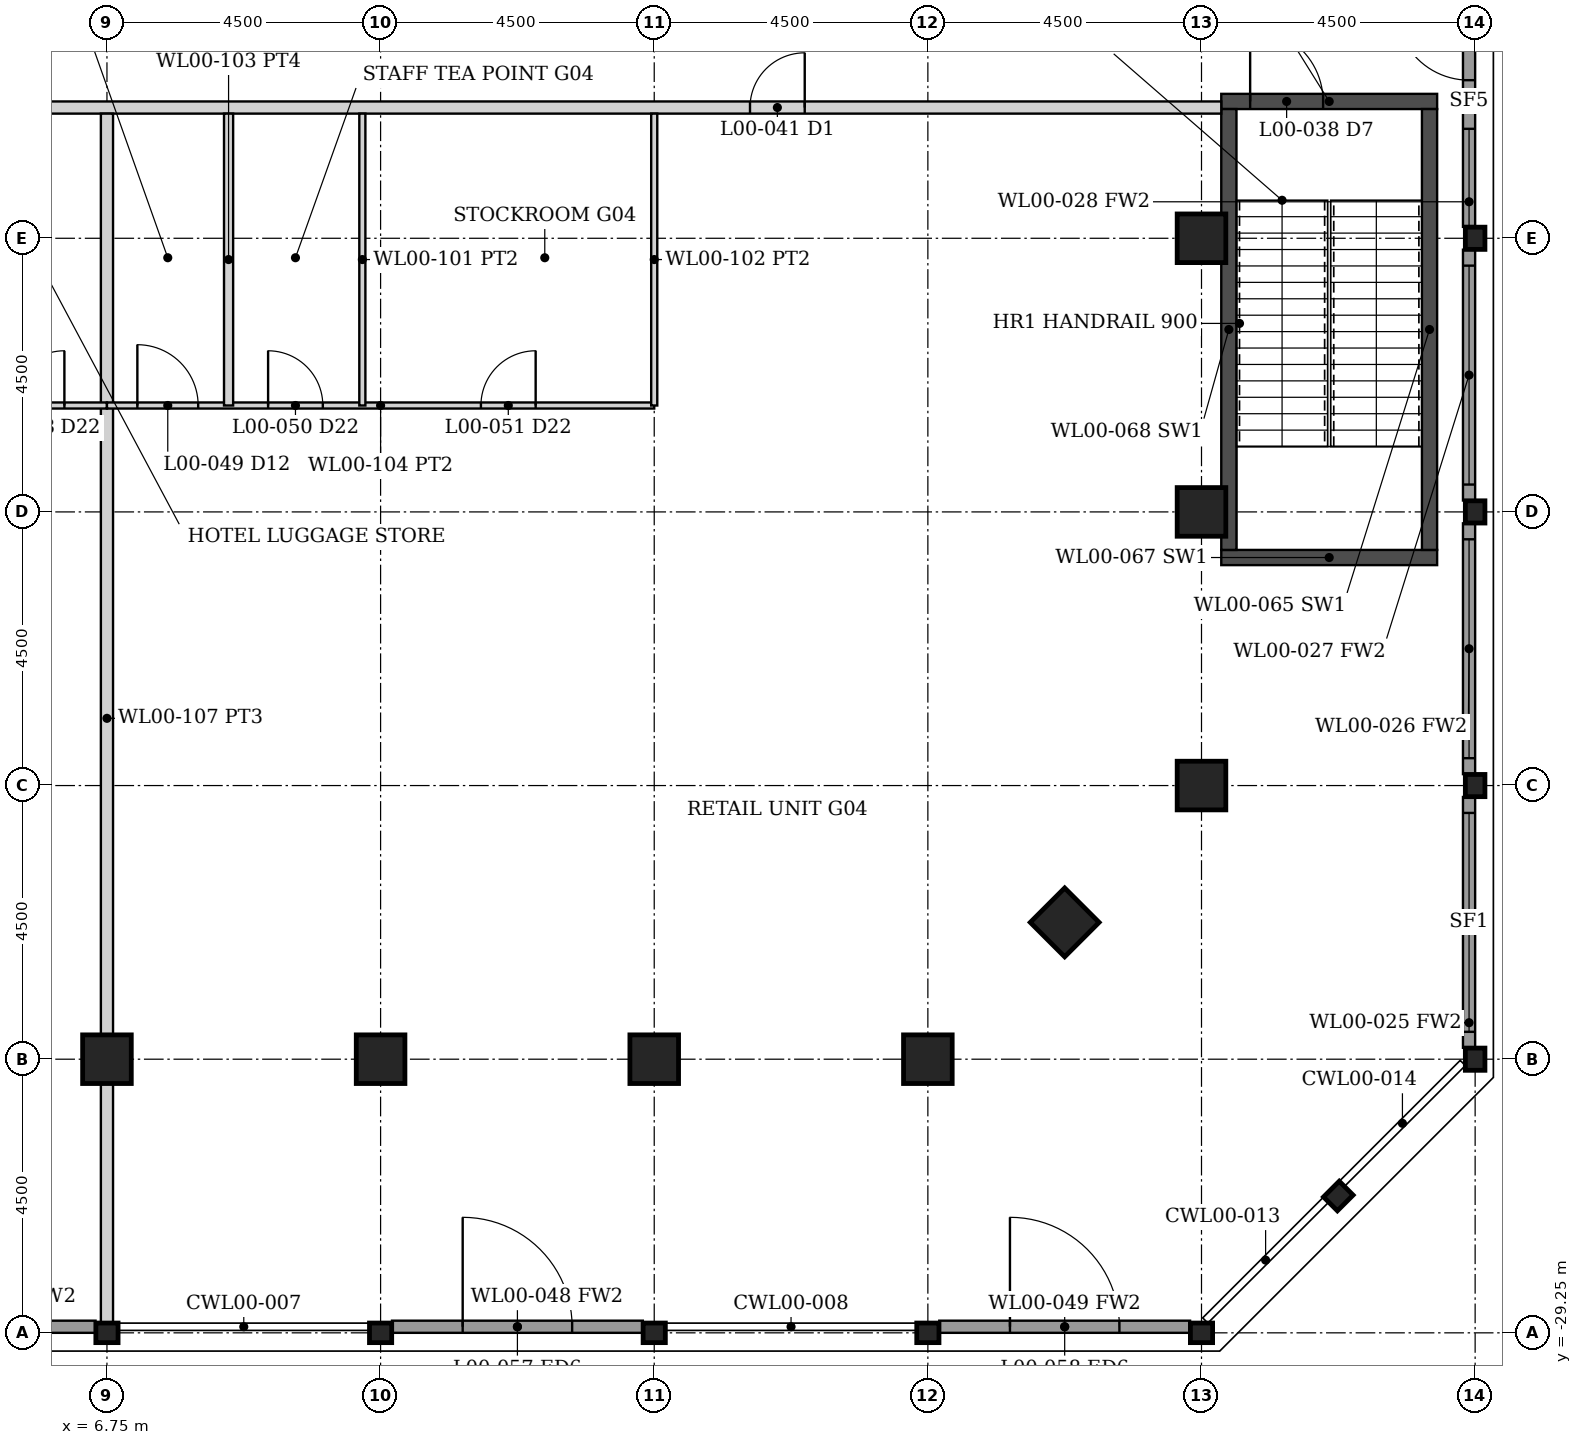
"""IFC4 building model, lengths in metres.
Left out: names, types, materials, properties, quantities, classifications, styles, units other than length and angle.
Written with IfcOpenShell. Run it as: python <this file> out.ifc"""

import sys

from ifc_helpers import new_model, si_unit, direction, frame, frame_2d, origin, origin_2d, place, context, subcontext, project, spatial, rectangle, hollow_rectangle, i_section, extrude, element, fill, save


model = new_model("IFC4")
c1 = context("Model", 3, precision=1e-05, world=origin(), true_north=direction((0.0, 1.0)))
c2 = subcontext(c1, "Body", "Model", "MODEL_VIEW")
j1 = project(units=[si_unit("LENGTHUNIT", "METRE"), si_unit("PLANEANGLEUNIT", "RADIAN")], contexts=[c1])
p1 = place(None, origin())
s1 = spatial("IfcSite", under=j1, at=p1, CompositionType="ELEMENT")
p2 = place(p1, origin())
s2 = spatial("IfcBuilding", under=s1, at=p2, CompositionType="ELEMENT")
p3 = place(p2, origin())
s3 = spatial("IfcBuildingStorey", under=s2, at=p3, CompositionType="ELEMENT", Elevation=0.0)
for number, where, z_axis, x_axis in (
    (1, (24.75, -20.25, -0.3), (0.0, 0.0, 1.0), (1.0, 0.0, 0.0)),
    (2, (24.75, -15.75, -0.3), (0.0, 0.0, 1.0), (1.0, 0.0, 0.0)),
    (3, (24.75, -11.25, -0.3), (0.0, 0.0, 1.0), (1.0, 0.0, 0.0)),
    (4, (6.75, -24.75, -0.3), (0.0, 0.0, 1.0), (0.0, 1.0, 0.0)),
    (5, (11.25, -24.75, -0.3), (0.0, 0.0, 1.0), (0.0, 1.0, 0.0)),
    (6, (15.75, -24.75, -0.3), (0.0, 0.0, 1.0), (0.0, 1.0, 0.0)),
    (7, (20.25, -24.75, -0.3), (0.0, 0.0, 1.0), (0.0, 1.0, 0.0)),
    (8, (22.5, -22.5, -0.3), (0.0, 0.0, 1.0), (0.707, -0.707, 0.0)),
):
    element("IfcColumn", number, at=place(p3, frame(where, z_axis=z_axis, x_axis=x_axis)), inside=s3, PredefinedType="COLUMN", context=c2, shape_type="SweptSolid", body=[
        extrude(hollow_rectangle(XDim=0.8, YDim=0.8, WallThickness=0.08, at=origin_2d()), origin(), (0.0, 0.0, 1.0), 6.3),
    ])
for number, where, z_axis, x_axis in (
    (9, (29.25, -24.75, -0.3), (0.0, 0.0, 1.0), (1.0, 0.0, 0.0)),
    (10, (29.25, -20.25, -0.3), (0.0, 0.0, 1.0), (1.0, 0.0, 0.0)),
    (11, (29.25, -15.75, -0.3), (0.0, 0.0, 1.0), (1.0, 0.0, 0.0)),
    (12, (29.25, -11.25, -0.3), (0.0, 0.0, 1.0), (1.0, 0.0, 0.0)),
    (13, (6.75, -29.25, -0.3), (0.0, 0.0, 1.0), (0.0, 1.0, 0.0)),
    (14, (11.25, -29.25, -0.3), (0.0, 0.0, 1.0), (0.0, 1.0, 0.0)),
    (15, (15.75, -29.25, -0.3), (0.0, 0.0, 1.0), (0.0, 1.0, 0.0)),
    (16, (20.25, -29.25, -0.3), (0.0, 0.0, 1.0), (0.0, 1.0, 0.0)),
    (17, (24.75, -29.25, -0.3), (0.0, 0.0, 1.0), (0.0, 1.0, 0.0)),
    (18, (27.0, -27.0, -0.3), (0.0, 0.0, 1.0), (0.707, -0.707, 0.0)),
):
    element("IfcColumn", number, at=place(p3, frame(where, z_axis=z_axis, x_axis=x_axis)), inside=s3, PredefinedType="COLUMN", context=c2, shape_type="SweptSolid", body=[
        extrude(i_section(OverallWidth=0.322, OverallDepth=0.365, WebThickness=0.027, FlangeThickness=0.044, FilletRadius=0.015, at=origin_2d()), origin(), (0.0, 0.0, 1.0), 6.3),
    ])
p4 = place(p3, frame((25.075, -16.5, 0.0), z_axis=(0.0, 0.0, 1.0), x_axis=(1.0, 0.0, 0.0)))
e19 = element("IfcWall", 19, at=p4, inside=s3, PredefinedType="SHEAR", context=c2, shape_type="SweptSolid", body=[
    extrude(rectangle(XDim=3.55, YDim=0.25, at=frame_2d((1.775, 0.0))), origin(), (0.0, 0.0, 1.0), 6.0),
])
p5 = place(p3, frame((25.075, -9.0, 0.0), z_axis=(0.0, 0.0, 1.0), x_axis=(1.0, 0.0, 0.0)))
e20 = element("IfcWall", 20, at=p5, inside=s3, PredefinedType="SHEAR", context=c2, shape_type="SweptSolid", body=[
    extrude(rectangle(XDim=3.55, YDim=0.25, at=frame_2d((1.775, 0.0))), origin(), (0.0, 0.0, 1.0), 6.0),
])
p6 = place(p5, frame((0.475, 0.0, 0.0)))
e21 = element("IfcOpeningElement", 21, at=p6, cuts=e20, PredefinedType="OPENING", context=c2, shape_type="SweptSolid", body=[
    extrude(rectangle(XDim=1.2, YDim=2.1, at=frame_2d((0.6, 1.05))), frame((0.0, 0.135, 0.0), z_axis=(0.0, -1.0, 0.0), x_axis=(1.0, 0.0, 0.0)), (0.0, 0.0, 1.0), 0.27),
])
for number, where, z_axis, x_axis in (
    (22, (25.2, -16.375, 0.0), (0.0, 0.0, 1.0), (0.0, 1.0, 0.0)),
    (23, (28.5, -16.375, 0.0), (0.0, 0.0, 1.0), (0.0, 1.0, 0.0)),
):
    element("IfcWall", number, at=place(p3, frame(where, z_axis=z_axis, x_axis=x_axis)), inside=s3, PredefinedType="SHEAR", context=c2, shape_type="SweptSolid", body=[
        extrude(rectangle(XDim=7.25, YDim=0.25, at=frame_2d((3.625, 0.0))), origin(), (0.0, 0.0, 1.0), 6.0),
    ])
p7 = place(p3, frame((2.438, -29.15, 0.0), z_axis=(0.0, 0.0, 1.0), x_axis=(1.0, 0.0, 0.0)))
e24 = element("IfcWall", 24, at=p7, inside=s3, PredefinedType="SOLIDWALL", context=c2, shape_type="SweptSolid", body=[
    extrude(rectangle(XDim=4.125, YDim=0.2, at=frame_2d((2.062, 0.0))), origin(), (0.0, 0.0, 1.0), 5.133),
])
p8 = place(p7, frame((1.162, 0.0, 0.0)))
e25 = element("IfcOpeningElement", 25, at=p8, cuts=e24, PredefinedType="OPENING", context=c2, shape_type="SweptSolid", body=[
    extrude(rectangle(XDim=1.8, YDim=2.7, at=frame_2d((0.9, 1.35))), frame((0.0, 0.11, 0.0), z_axis=(0.0, -1.0, 0.0), x_axis=(1.0, 0.0, 0.0)), (0.0, 0.0, 1.0), 0.22),
])
p9 = place(p3, frame((11.438, -29.15, 0.0), z_axis=(0.0, 0.0, 1.0), x_axis=(1.0, 0.0, 0.0)))
e26 = element("IfcWall", 26, at=p9, inside=s3, PredefinedType="SOLIDWALL", context=c2, shape_type="SweptSolid", body=[
    extrude(rectangle(XDim=4.125, YDim=0.2, at=frame_2d((2.062, 0.0))), origin(), (0.0, 0.0, 1.0), 5.133),
])
p10 = place(p9, frame((1.162, 0.0, 0.0)))
e27 = element("IfcOpeningElement", 27, at=p10, cuts=e26, PredefinedType="OPENING", context=c2, shape_type="SweptSolid", body=[
    extrude(rectangle(XDim=1.8, YDim=2.7, at=frame_2d((0.9, 1.35))), frame((0.0, 0.11, 0.0), z_axis=(0.0, -1.0, 0.0), x_axis=(1.0, 0.0, 0.0)), (0.0, 0.0, 1.0), 0.22),
])
p11 = place(p3, frame((20.438, -29.15, 0.0), z_axis=(0.0, 0.0, 1.0), x_axis=(1.0, 0.0, 0.0)))
e28 = element("IfcWall", 28, at=p11, inside=s3, PredefinedType="SOLIDWALL", context=c2, shape_type="SweptSolid", body=[
    extrude(rectangle(XDim=4.125, YDim=0.2, at=frame_2d((2.062, 0.0))), origin(), (0.0, 0.0, 1.0), 5.133),
])
p12 = place(p11, frame((1.162, 0.0, 0.0)))
e29 = element("IfcOpeningElement", 29, at=p12, cuts=e28, PredefinedType="OPENING", context=c2, shape_type="SweptSolid", body=[
    extrude(rectangle(XDim=1.8, YDim=2.7, at=frame_2d((0.9, 1.35))), frame((0.0, 0.11, 0.0), z_axis=(0.0, -1.0, 0.0), x_axis=(1.0, 0.0, 0.0)), (0.0, 0.0, 1.0), 0.22),
])
p13 = place(p3, frame((29.15, -24.562, 0.0), z_axis=(0.0, 0.0, 1.0), x_axis=(0.0, 1.0, 0.0)))
e30 = element("IfcWall", 30, at=p13, inside=s3, PredefinedType="SOLIDWALL", context=c2, shape_type="SweptSolid", body=[
    extrude(rectangle(XDim=4.125, YDim=0.2, at=frame_2d((2.062, 0.0))), origin(), (0.0, 0.0, 1.0), 5.133),
])
p14 = place(p13, frame((0.262, 0.0, 0.15)))
e31 = element("IfcOpeningElement", 31, at=p14, cuts=e30, PredefinedType="OPENING", context=c2, shape_type="SweptSolid", body=[
    extrude(rectangle(XDim=3.6, YDim=4.833, at=frame_2d((1.8, 2.417))), frame((0.0, 0.11, 0.0), z_axis=(0.0, -1.0, 0.0), x_axis=(1.0, 0.0, 0.0)), (0.0, 0.0, 1.0), 0.22),
])
p15 = place(p3, frame((29.15, -20.062, 0.0), z_axis=(0.0, 0.0, 1.0), x_axis=(0.0, 1.0, 0.0)))
e32 = element("IfcWall", 32, at=p15, inside=s3, PredefinedType="SOLIDWALL", context=c2, shape_type="SweptSolid", body=[
    extrude(rectangle(XDim=4.125, YDim=0.2, at=frame_2d((2.062, 0.0))), origin(), (0.0, 0.0, 1.0), 5.133),
])
p16 = place(p15, frame((0.262, 0.0, 0.15)))
e33 = element("IfcOpeningElement", 33, at=p16, cuts=e32, PredefinedType="OPENING", context=c2, shape_type="SweptSolid", body=[
    extrude(rectangle(XDim=3.6, YDim=4.833, at=frame_2d((1.8, 2.417))), frame((0.0, 0.11, 0.0), z_axis=(0.0, -1.0, 0.0), x_axis=(1.0, 0.0, 0.0)), (0.0, 0.0, 1.0), 0.22),
])
p17 = place(p3, frame((29.15, -15.562, 0.0), z_axis=(0.0, 0.0, 1.0), x_axis=(0.0, 1.0, 0.0)))
e34 = element("IfcWall", 34, at=p17, inside=s3, PredefinedType="SOLIDWALL", context=c2, shape_type="SweptSolid", body=[
    extrude(rectangle(XDim=4.125, YDim=0.2, at=frame_2d((2.062, 0.0))), origin(), (0.0, 0.0, 1.0), 5.133),
])
p18 = place(p17, frame((0.262, 0.0, 0.15)))
e35 = element("IfcOpeningElement", 35, at=p18, cuts=e34, PredefinedType="OPENING", context=c2, shape_type="SweptSolid", body=[
    extrude(rectangle(XDim=3.6, YDim=4.833, at=frame_2d((1.8, 2.417))), frame((0.0, 0.11, 0.0), z_axis=(0.0, -1.0, 0.0), x_axis=(1.0, 0.0, 0.0)), (0.0, 0.0, 1.0), 0.22),
])
p19 = place(p3, frame((29.15, -11.062, 0.0), z_axis=(0.0, 0.0, 1.0), x_axis=(0.0, 1.0, 0.0)))
e36 = element("IfcWall", 36, at=p19, inside=s3, PredefinedType="SOLIDWALL", context=c2, shape_type="SweptSolid", body=[
    extrude(rectangle(XDim=4.125, YDim=0.2, at=frame_2d((2.062, 0.0))), origin(), (0.0, 0.0, 1.0), 5.133),
])
p20 = place(p19, frame((2.412, 0.0, 0.0)))
e37 = element("IfcOpeningElement", 37, at=p20, cuts=e36, PredefinedType="OPENING", context=c2, shape_type="SweptSolid", body=[
    extrude(rectangle(XDim=1.2, YDim=2.4, at=frame_2d((0.6, 1.2))), frame((0.0, 0.11, 0.0), z_axis=(0.0, -1.0, 0.0), x_axis=(1.0, 0.0, 0.0)), (0.0, 0.0, 1.0), 0.22),
])
p21 = place(p19, frame((0.012, 0.0, 0.15)))
e38 = element("IfcOpeningElement", 38, at=p21, cuts=e36, PredefinedType="OPENING", context=c2, shape_type="SweptSolid", body=[
    extrude(rectangle(XDim=1.6, YDim=4.833, at=frame_2d((0.8, 2.417))), frame((0.0, 0.11, 0.0), z_axis=(0.0, -1.0, 0.0), x_axis=(1.0, 0.0, 0.0)), (0.0, 0.0, 1.0), 0.22),
])
p22 = place(p3, frame((-25.075, -9.1, 0.0), z_axis=(0.0, 0.0, 1.0), x_axis=(1.0, 0.0, 0.0)))
e39 = element("IfcWall", 39, at=p22, inside=s3, PredefinedType="PARTITIONING", context=c2, shape_type="SweptSolid", body=[
    extrude(rectangle(XDim=50.15, YDim=0.2, at=frame_2d((25.075, 0.0))), origin(), (0.0, 0.0, 1.0), 4.829),
])
p23 = place(p22, frame((6.85, 0.0, 0.0)))
e40 = element("IfcOpeningElement", 40, at=p23, cuts=e39, PredefinedType="OPENING", context=c2, shape_type="SweptSolid", body=[
    extrude(rectangle(XDim=0.9, YDim=2.1, at=frame_2d((0.45, 1.05))), frame((0.0, 0.11, 0.0), z_axis=(0.0, -1.0, 0.0), x_axis=(1.0, 0.0, 0.0)), (0.0, 0.0, 1.0), 0.22),
])
p24 = place(p22, frame((24.625, 0.0, 0.0)))
e41 = element("IfcOpeningElement", 41, at=p24, cuts=e39, PredefinedType="OPENING", context=c2, shape_type="SweptSolid", body=[
    extrude(rectangle(XDim=0.9, YDim=2.1, at=frame_2d((0.45, 1.05))), frame((0.0, 0.11, 0.0), z_axis=(0.0, -1.0, 0.0), x_axis=(1.0, 0.0, 0.0)), (0.0, 0.0, 1.0), 0.22),
])
p25 = place(p22, frame((42.4, 0.0, 0.0)))
e42 = element("IfcOpeningElement", 42, at=p25, cuts=e39, PredefinedType="OPENING", context=c2, shape_type="SweptSolid", body=[
    extrude(rectangle(XDim=0.9, YDim=2.1, at=frame_2d((0.45, 1.05))), frame((0.0, 0.11, 0.0), z_axis=(0.0, -1.0, 0.0), x_axis=(1.0, 0.0, 0.0)), (0.0, 0.0, 1.0), 0.22),
])
p26 = place(p3, frame((6.75, -29.089, 0.0), z_axis=(0.0, 0.0, 1.0), x_axis=(0.0, 1.0, 0.0)))
e43 = element("IfcWall", 43, at=p26, inside=s3, PredefinedType="PARTITIONING", context=c2, shape_type="SweptSolid", body=[
    extrude(rectangle(XDim=19.889, YDim=0.2, at=frame_2d((9.944, 0.0))), origin(), (0.0, 0.0, 1.0), 4.829),
])
p27 = place(p3, frame((2.25, -14.0, 0.0), z_axis=(0.0, 0.0, 1.0), x_axis=(1.0, 0.0, 0.0)))
e44 = element("IfcWall", 44, at=p27, inside=s3, PredefinedType="PARTITIONING", context=c2, shape_type="SweptSolid", body=[
    extrude(rectangle(XDim=4.5, YDim=0.1, at=frame_2d((2.25, 0.0))), origin(), (0.0, 0.0, 1.0), 4.829),
])
p28 = place(p27, frame((0.6, 0.0, 0.0)))
e45 = element("IfcOpeningElement", 45, at=p28, cuts=e44, PredefinedType="OPENING", context=c2, shape_type="SweptSolid", body=[
    extrude(rectangle(XDim=1.0, YDim=2.1, at=frame_2d((0.5, 1.05))), frame((0.0, 0.06, 0.0), z_axis=(0.0, -1.0, 0.0), x_axis=(1.0, 0.0, 0.0)), (0.0, 0.0, 1.0), 0.12),
])
p29 = place(p27, frame((2.9, 0.0, 0.0)))
e46 = element("IfcOpeningElement", 46, at=p29, cuts=e44, PredefinedType="OPENING", context=c2, shape_type="SweptSolid", body=[
    extrude(rectangle(XDim=0.9, YDim=2.1, at=frame_2d((0.45, 1.05))), frame((0.0, 0.06, 0.0), z_axis=(0.0, -1.0, 0.0), x_axis=(1.0, 0.0, 0.0)), (0.0, 0.0, 1.0), 0.12),
])
p30 = place(p3, frame((6.75, -14.0, 0.0), z_axis=(0.0, 0.0, 1.0), x_axis=(1.0, 0.0, 0.0)))
e47 = element("IfcWall", 47, at=p30, inside=s3, PredefinedType="PARTITIONING", context=c2, shape_type="SweptSolid", body=[
    extrude(rectangle(XDim=9.0, YDim=0.1, at=frame_2d((4.5, 0.0))), origin(), (0.0, 0.0, 1.0), 4.829),
])
p31 = place(p30, frame((6.15, 0.0, 0.0)))
e48 = element("IfcOpeningElement", 48, at=p31, cuts=e47, PredefinedType="OPENING", context=c2, shape_type="SweptSolid", body=[
    extrude(rectangle(XDim=0.9, YDim=2.1, at=frame_2d((0.45, 1.05))), frame((0.0, 0.06, 0.0), z_axis=(0.0, -1.0, 0.0), x_axis=(1.0, 0.0, 0.0)), (0.0, 0.0, 1.0), 0.12),
])
p32 = place(p30, frame((2.65, 0.0, 0.0)))
e49 = element("IfcOpeningElement", 49, at=p32, cuts=e47, PredefinedType="OPENING", context=c2, shape_type="SweptSolid", body=[
    extrude(rectangle(XDim=0.9, YDim=2.1, at=frame_2d((0.45, 1.05))), frame((0.0, 0.06, 0.0), z_axis=(0.0, -1.0, 0.0), x_axis=(1.0, 0.0, 0.0)), (0.0, 0.0, 1.0), 0.12),
])
p33 = place(p30, frame((0.5, 0.0, 0.0)))
e50 = element("IfcOpeningElement", 50, at=p33, cuts=e47, PredefinedType="OPENING", context=c2, shape_type="SweptSolid", body=[
    extrude(rectangle(XDim=1.0, YDim=2.1, at=frame_2d((0.5, 1.05))), frame((0.0, 0.06, 0.0), z_axis=(0.0, -1.0, 0.0), x_axis=(1.0, 0.0, 0.0)), (0.0, 0.0, 1.0), 0.12),
])
p34 = place(p3, frame((8.75, -14.0, 0.0), z_axis=(0.0, 0.0, 1.0), x_axis=(0.0, 1.0, 0.0)))
e51 = element("IfcWall", 51, at=p34, inside=s3, PredefinedType="PARTITIONING", context=c2, shape_type="SweptSolid", body=[
    extrude(rectangle(XDim=4.8, YDim=0.15, at=frame_2d((2.4, 0.0))), origin(), (0.0, 0.0, 1.0), 4.829),
])
for number, where, z_axis, x_axis in (
    (52, (10.95, -14.0, 0.0), (0.0, 0.0, 1.0), (0.0, 1.0, 0.0)),
    (53, (15.75, -14.0, 0.0), (0.0, 0.0, 1.0), (0.0, 1.0, 0.0)),
):
    element("IfcWall", number, at=place(p3, frame(where, z_axis=z_axis, x_axis=x_axis)), inside=s3, PredefinedType="PARTITIONING", context=c2, shape_type="SweptSolid", body=[
        extrude(rectangle(XDim=4.8, YDim=0.1, at=frame_2d((2.4, 0.0))), origin(), (0.0, 0.0, 1.0), 4.829),
    ])
p35 = place(p10, origin())
e54 = element("IfcDoor", 54, at=p35, inside=s3, OperationType="DOUBLE_DOOR_SINGLE_SWING", PredefinedType="DOOR", context=c2, shape_type="SweptSolid", body=[
    extrude(rectangle(XDim=1.8, YDim=2.7, at=frame_2d((0.9, 1.35))), frame((0.0, 0.025, 0.0), z_axis=(0.0, -1.0, 0.0), x_axis=(1.0, 0.0, 0.0)), (0.0, 0.0, 1.0), 0.05),
])
fill(e27, e54)
p36 = place(p12, origin())
e55 = element("IfcDoor", 55, at=p36, inside=s3, OperationType="DOUBLE_DOOR_SINGLE_SWING", PredefinedType="DOOR", context=c2, shape_type="SweptSolid", body=[
    extrude(rectangle(XDim=1.8, YDim=2.7, at=frame_2d((0.9, 1.35))), frame((0.0, 0.025, 0.0), z_axis=(0.0, -1.0, 0.0), x_axis=(1.0, 0.0, 0.0)), (0.0, 0.0, 1.0), 0.05),
])
fill(e29, e55)
p37 = place(p14, origin())
e56 = element("IfcWindow", 56, at=p37, inside=s3, PartitioningType="SINGLE_PANEL", PredefinedType="WINDOW", context=c2, shape_type="SweptSolid", body=[
    extrude(rectangle(XDim=3.6, YDim=4.833, at=frame_2d((1.8, 2.417))), frame((0.0, 0.03, 0.0), z_axis=(0.0, -1.0, 0.0), x_axis=(1.0, 0.0, 0.0)), (0.0, 0.0, 1.0), 0.06),
])
fill(e31, e56)
p38 = place(p16, origin())
e57 = element("IfcWindow", 57, at=p38, inside=s3, PartitioningType="SINGLE_PANEL", PredefinedType="WINDOW", context=c2, shape_type="SweptSolid", body=[
    extrude(rectangle(XDim=3.6, YDim=4.833, at=frame_2d((1.8, 2.417))), frame((0.0, 0.03, 0.0), z_axis=(0.0, -1.0, 0.0), x_axis=(1.0, 0.0, 0.0)), (0.0, 0.0, 1.0), 0.06),
])
fill(e33, e57)
p39 = place(p18, origin())
e58 = element("IfcWindow", 58, at=p39, inside=s3, PartitioningType="SINGLE_PANEL", PredefinedType="WINDOW", context=c2, shape_type="SweptSolid", body=[
    extrude(rectangle(XDim=3.6, YDim=4.833, at=frame_2d((1.8, 2.417))), frame((0.0, 0.03, 0.0), z_axis=(0.0, -1.0, 0.0), x_axis=(1.0, 0.0, 0.0)), (0.0, 0.0, 1.0), 0.06),
])
fill(e35, e58)
p40 = place(p20, origin())
e59 = element("IfcDoor", 59, at=p40, inside=s3, OperationType="SINGLE_SWING_RIGHT", PredefinedType="DOOR", context=c2, shape_type="SweptSolid", body=[
    extrude(rectangle(XDim=1.2, YDim=2.4, at=frame_2d((0.6, 1.2))), frame((0.0, 0.025, 0.0), z_axis=(0.0, -1.0, 0.0), x_axis=(1.0, 0.0, 0.0)), (0.0, 0.0, 1.0), 0.05),
])
fill(e37, e59)
p41 = place(p21, origin())
e60 = element("IfcWindow", 60, at=p41, inside=s3, PartitioningType="SINGLE_PANEL", PredefinedType="WINDOW", context=c2, shape_type="SweptSolid", body=[
    extrude(rectangle(XDim=1.6, YDim=4.833, at=frame_2d((0.8, 2.417))), frame((0.0, 0.03, 0.0), z_axis=(0.0, -1.0, 0.0), x_axis=(1.0, 0.0, 0.0)), (0.0, 0.0, 1.0), 0.06),
])
fill(e38, e60)
p42 = place(p29, origin())
e61 = element("IfcDoor", 61, at=p42, inside=s3, OperationType="SINGLE_SWING_RIGHT", PredefinedType="DOOR", context=c2, shape_type="SweptSolid", body=[
    extrude(rectangle(XDim=0.9, YDim=2.1, at=frame_2d((0.45, 1.05))), frame((0.0, 0.025, 0.0), z_axis=(0.0, -1.0, 0.0), x_axis=(1.0, 0.0, 0.0)), (0.0, 0.0, 1.0), 0.05),
])
fill(e46, e61)
p43 = place(p31, origin())
e62 = element("IfcDoor", 62, at=p43, inside=s3, OperationType="SINGLE_SWING_RIGHT", PredefinedType="DOOR", context=c2, shape_type="SweptSolid", body=[
    extrude(rectangle(XDim=0.9, YDim=2.1, at=frame_2d((0.45, 1.05))), frame((0.0, 0.025, 0.0), z_axis=(0.0, -1.0, 0.0), x_axis=(1.0, 0.0, 0.0)), (0.0, 0.0, 1.0), 0.05),
])
fill(e48, e62)
p44 = place(p32, origin())
e63 = element("IfcDoor", 63, at=p44, inside=s3, OperationType="SINGLE_SWING_LEFT", PredefinedType="DOOR", context=c2, shape_type="SweptSolid", body=[
    extrude(rectangle(XDim=0.9, YDim=2.1, at=frame_2d((0.45, 1.05))), frame((0.0, 0.025, 0.0), z_axis=(0.0, -1.0, 0.0), x_axis=(1.0, 0.0, 0.0)), (0.0, 0.0, 1.0), 0.05),
])
fill(e49, e63)
p45 = place(p33, origin())
e64 = element("IfcDoor", 64, at=p45, inside=s3, OperationType="SINGLE_SWING_LEFT", PredefinedType="DOOR", context=c2, shape_type="SweptSolid", body=[
    extrude(rectangle(XDim=1.0, YDim=2.1, at=frame_2d((0.5, 1.05))), frame((0.0, 0.025, 0.0), z_axis=(0.0, -1.0, 0.0), x_axis=(1.0, 0.0, 0.0)), (0.0, 0.0, 1.0), 0.05),
])
fill(e50, e64)
p46 = place(p25, origin())
e65 = element("IfcDoor", 65, at=p46, inside=s3, OperationType="SINGLE_SWING_RIGHT", PredefinedType="DOOR", context=c2, shape_type="SweptSolid", body=[
    extrude(rectangle(XDim=0.9, YDim=2.1, at=frame_2d((0.45, 1.05))), frame((0.0, 0.025, 0.0), z_axis=(0.0, -1.0, 0.0), x_axis=(1.0, 0.0, 0.0)), (0.0, 0.0, 1.0), 0.05),
])
fill(e42, e65)
p47 = place(p6, origin())
e66 = element("IfcDoor", 66, at=p47, inside=s3, OperationType="SINGLE_SWING_LEFT", PredefinedType="DOOR", context=c2, shape_type="SweptSolid", body=[
    extrude(rectangle(XDim=1.2, YDim=2.1, at=frame_2d((0.6, 1.05))), frame((0.0, 0.025, 0.0), z_axis=(0.0, -1.0, 0.0), x_axis=(1.0, 0.0, 0.0)), (0.0, 0.0, 1.0), 0.05),
])
fill(e21, e66)
save(model, sys.argv[1])
